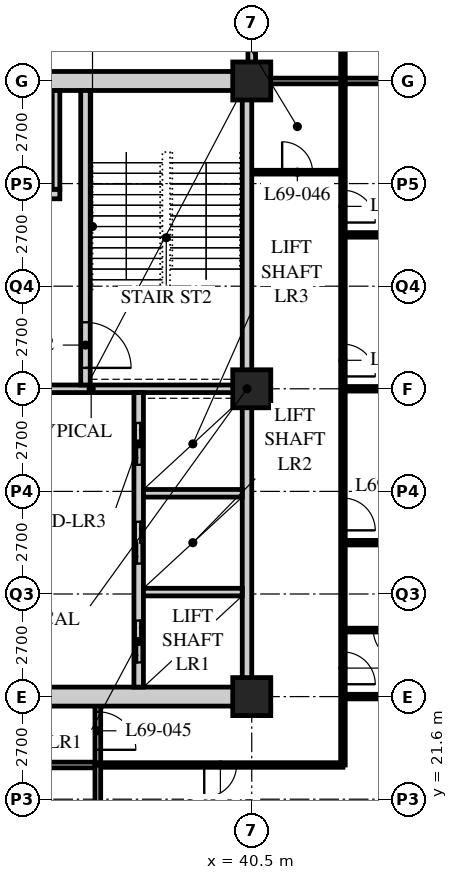
"""IFC4 building model, lengths in metres.
Left out: names, types, materials, properties, quantities, classifications, styles, units other than length and angle.
Written with IfcOpenShell. Run it as: python <this file> out.ifc"""

import sys

from ifc_helpers import new_model, si_unit, direction, frame, frame_2d, origin, origin_2d, place, context, subcontext, project, spatial, rectangle, hollow_rectangle, extrude, element, fill, save


model = new_model("IFC4")
c1 = context("Model", 3, precision=1e-05, world=origin(), true_north=direction((0.0, 1.0)))
c2 = subcontext(c1, "Body", "Model", "MODEL_VIEW")
j1 = project(units=[si_unit("LENGTHUNIT", "METRE"), si_unit("PLANEANGLEUNIT", "RADIAN")], contexts=[c1])
p1 = place(None, origin())
s1 = spatial("IfcSite", under=j1, at=p1, CompositionType="ELEMENT")
p2 = place(p1, origin())
s2 = spatial("IfcBuilding", under=s1, at=p2, CompositionType="ELEMENT")
p3 = place(p2, frame((0.0, 0.0, 269.7)))
s3 = spatial("IfcBuildingStorey", under=s2, at=p3, CompositionType="ELEMENT", Elevation=269.7)
for number, where, z_axis, x_axis in (
    (1, (40.5, 24.3, 0.0), (0.0, 0.0, 1.0), (1.0, 0.0, 0.0)),
    (2, (40.5, 32.4, 0.0), (0.0, 0.0, 1.0), (1.0, 0.0, 0.0)),
    (3, (40.5, 40.5, 0.0), (0.0, 0.0, 1.0), (1.0, 0.0, 0.0)),
):
    element("IfcColumn", number, at=place(p3, frame(where, z_axis=z_axis, x_axis=x_axis)), inside=s3, PredefinedType="COLUMN", context=c2, shape_type="SweptSolid", body=[
        extrude(hollow_rectangle(XDim=1.0, YDim=1.0, WallThickness=0.1, at=origin_2d()), origin(), (0.0, 0.0, 1.0), 3.9),
    ])
p4 = place(p3, frame((12.15, 22.5, 0.0), z_axis=(0.0, 0.0, 1.0), x_axis=(1.0, 0.0, 0.0)))
e4 = element("IfcWall", 4, at=p4, inside=s3, PredefinedType="PARTITIONING", context=c2, shape_type="SweptSolid", body=[
    extrude(rectangle(XDim=24.3, YDim=0.15, at=frame_2d((12.15, 0.0))), origin(), (0.0, 0.0, 1.0), 3.69),
])
p5 = place(p4, frame((4.45, 0.0, 0.0)))
e5 = element("IfcOpeningElement", 5, at=p5, cuts=e4, PredefinedType="OPENING", context=c2, shape_type="SweptSolid", body=[
    extrude(rectangle(XDim=1.0, YDim=2.1, at=frame_2d((0.5, 1.05))), frame((0.0, 0.085, 0.0), z_axis=(0.0, -1.0, 0.0), x_axis=(1.0, 0.0, 0.0)), (0.0, 0.0, 1.0), 0.17),
])
p6 = place(p4, frame((12.55, 0.0, 0.0)))
e6 = element("IfcOpeningElement", 6, at=p6, cuts=e4, PredefinedType="OPENING", context=c2, shape_type="SweptSolid", body=[
    extrude(rectangle(XDim=1.0, YDim=2.1, at=frame_2d((0.5, 1.05))), frame((0.0, 0.085, 0.0), z_axis=(0.0, -1.0, 0.0), x_axis=(1.0, 0.0, 0.0)), (0.0, 0.0, 1.0), 0.17),
])
p7 = place(p4, frame((2.625, 0.0, 0.0)))
e7 = element("IfcOpeningElement", 7, at=p7, cuts=e4, PredefinedType="OPENING", context=c2, shape_type="SweptSolid", body=[
    extrude(rectangle(XDim=1.0, YDim=2.1, at=frame_2d((0.5, 1.05))), frame((0.0, 0.085, 0.0), z_axis=(0.0, -1.0, 0.0), x_axis=(1.0, 0.0, 0.0)), (0.0, 0.0, 1.0), 0.17),
])
p8 = place(p3, frame((36.45, 22.5, 0.0), z_axis=(0.0, 0.0, 1.0), x_axis=(0.0, 1.0, 0.0)))
e8 = element("IfcWall", 8, at=p8, inside=s3, PredefinedType="PARTITIONING", context=c2, shape_type="SweptSolid", body=[
    extrude(rectangle(XDim=1.8, YDim=0.15, at=frame_2d((0.9, 0.0))), origin(), (0.0, 0.0, 1.0), 3.69),
])
p9 = place(p8, frame((0.4, 0.0, 0.0)))
e9 = element("IfcOpeningElement", 9, at=p9, cuts=e8, PredefinedType="OPENING", context=c2, shape_type="SweptSolid", body=[
    extrude(rectangle(XDim=1.0, YDim=2.1, at=frame_2d((0.5, 1.05))), frame((0.0, 0.085, 0.0), z_axis=(0.0, -1.0, 0.0), x_axis=(1.0, 0.0, 0.0)), (0.0, 0.0, 1.0), 0.17),
])
p10 = place(p3, frame((40.5, 40.5, 0.0), z_axis=(0.0, 0.0, 1.0), x_axis=(0.0, 1.0, 0.0)))
e10 = element("IfcWall", 10, at=p10, inside=s3, PredefinedType="SOLIDWALL", context=c2, shape_type="SweptSolid", body=[
    extrude(rectangle(XDim=10.35, YDim=0.2, at=frame_2d((5.175, 0.0))), origin(), (0.0, 0.0, 1.0), 3.078),
])
p11 = place(p3, frame((40.5, 38.1, 0.0), z_axis=(0.0, 0.0, 1.0), x_axis=(1.0, 0.0, 0.0)))
e11 = element("IfcWall", 11, at=p11, inside=s3, PredefinedType="PARTITIONING", context=c2, shape_type="SweptSolid", body=[
    extrude(rectangle(XDim=2.4, YDim=0.1, at=frame_2d((1.2, 0.0))), origin(), (0.0, 0.0, 1.0), 3.69),
])
p12 = place(p11, frame((0.8, 0.0, 0.0)))
e12 = element("IfcOpeningElement", 12, at=p12, cuts=e11, PredefinedType="OPENING", context=c2, shape_type="SweptSolid", body=[
    extrude(rectangle(XDim=0.8, YDim=2.1, at=frame_2d((0.4, 1.05))), frame((0.0, 0.06, 0.0), z_axis=(0.0, -1.0, 0.0), x_axis=(1.0, 0.0, 0.0)), (0.0, 0.0, 1.0), 0.12),
])
p13 = place(p3, frame((42.9, 22.5, 0.0), z_axis=(0.0, 0.0, 1.0), x_axis=(0.0, 1.0, 0.0)))
e13 = element("IfcWall", 13, at=p13, inside=s3, PredefinedType="PARTITIONING", context=c2, shape_type="SweptSolid", body=[
    extrude(rectangle(XDim=18.0, YDim=0.12, at=frame_2d((9.0, 0.0))), origin(), (0.0, 0.0, 1.0), 3.69),
])
p14 = place(p13, frame((2.125, 0.0, 0.0)))
e14 = element("IfcOpeningElement", 14, at=p14, cuts=e13, PredefinedType="OPENING", context=c2, shape_type="SweptSolid", body=[
    extrude(rectangle(XDim=0.85, YDim=2.1, at=frame_2d((0.425, 1.05))), frame((0.0, 0.07, 0.0), z_axis=(0.0, -1.0, 0.0), x_axis=(1.0, 0.0, 0.0)), (0.0, 0.0, 1.0), 0.14),
])
p15 = place(p13, frame((6.175, 0.0, 0.0)))
e15 = element("IfcOpeningElement", 15, at=p15, cuts=e13, PredefinedType="OPENING", context=c2, shape_type="SweptSolid", body=[
    extrude(rectangle(XDim=0.85, YDim=2.1, at=frame_2d((0.425, 1.05))), frame((0.0, 0.07, 0.0), z_axis=(0.0, -1.0, 0.0), x_axis=(1.0, 0.0, 0.0)), (0.0, 0.0, 1.0), 0.14),
])
p16 = place(p13, frame((10.225, 0.0, 0.0)))
e16 = element("IfcOpeningElement", 16, at=p16, cuts=e13, PredefinedType="OPENING", context=c2, shape_type="SweptSolid", body=[
    extrude(rectangle(XDim=0.85, YDim=2.1, at=frame_2d((0.425, 1.05))), frame((0.0, 0.07, 0.0), z_axis=(0.0, -1.0, 0.0), x_axis=(1.0, 0.0, 0.0)), (0.0, 0.0, 1.0), 0.14),
])
p17 = place(p13, frame((14.275, 0.0, 0.0)))
e17 = element("IfcOpeningElement", 17, at=p17, cuts=e13, PredefinedType="OPENING", context=c2, shape_type="SweptSolid", body=[
    extrude(rectangle(XDim=0.85, YDim=2.1, at=frame_2d((0.425, 1.05))), frame((0.0, 0.07, 0.0), z_axis=(0.0, -1.0, 0.0), x_axis=(1.0, 0.0, 0.0)), (0.0, 0.0, 1.0), 0.14),
])
p18 = place(p3, frame((36.45, 22.5, 0.0), z_axis=(0.0, 0.0, 1.0), x_axis=(1.0, 0.0, 0.0)))
e18 = element("IfcWall", 18, at=p18, inside=s3, PredefinedType="PARTITIONING", context=c2, shape_type="SweptSolid", body=[
    extrude(rectangle(XDim=6.45, YDim=0.12, at=frame_2d((3.225, 0.0))), origin(), (0.0, 0.0, 1.0), 3.69),
])
p19 = place(p18, frame((2.8, 0.0, 0.0)))
e19 = element("IfcOpeningElement", 19, at=p19, cuts=e18, PredefinedType="OPENING", context=c2, shape_type="SweptSolid", body=[
    extrude(rectangle(XDim=0.85, YDim=2.1, at=frame_2d((0.425, 1.05))), frame((0.0, 0.07, 0.0), z_axis=(0.0, -1.0, 0.0), x_axis=(1.0, 0.0, 0.0)), (0.0, 0.0, 1.0), 0.14),
])
p20 = place(p3, frame((42.9, 24.3, 0.0), z_axis=(0.0, 0.0, 1.0), x_axis=(1.0, 0.0, 0.0)))
e20 = element("IfcWall", 20, at=p20, inside=s3, PredefinedType="PARTITIONING", context=c2, shape_type="SweptSolid", body=[
    extrude(rectangle(XDim=9.45, YDim=0.12, at=frame_2d((4.725, 0.0))), origin(), (0.0, 0.0, 1.0), 3.078),
])
p21 = place(p3, frame((40.5, 40.5, 0.0), z_axis=(0.0, 0.0, 1.0), x_axis=(1.0, 0.0, 0.0)))
e21 = element("IfcWall", 21, at=p21, inside=s3, PredefinedType="PARTITIONING", context=c2, shape_type="SweptSolid", body=[
    extrude(rectangle(XDim=15.9, YDim=0.15, at=frame_2d((7.95, 0.0))), origin(), (0.0, 0.0, 1.0), 3.078),
])
p22 = place(p3, frame((36.45, 16.5, 0.0), z_axis=(0.0, 0.0, 1.0), x_axis=(0.0, 1.0, 0.0)))
e22 = element("IfcWall", 22, at=p22, inside=s3, PredefinedType="PARTITIONING", context=c2, shape_type="SweptSolid", body=[
    extrude(rectangle(XDim=6.0, YDim=0.15, at=frame_2d((3.0, 0.0))), origin(), (0.0, 0.0, 1.0), 3.69),
])
p23 = place(p3, frame((42.9, 26.05, 0.0), z_axis=(0.0, 0.0, 1.0), x_axis=(1.0, 0.0, 0.0)))
e23 = element("IfcWall", 23, at=p23, inside=s3, PredefinedType="PARTITIONING", context=c2, shape_type="SweptSolid", body=[
    extrude(rectangle(XDim=2.4, YDim=0.1, at=frame_2d((1.2, 0.0))), origin(), (0.0, 0.0, 1.0), 3.69),
])
p24 = place(p23, frame((0.8, 0.0, 0.0)))
e24 = element("IfcOpeningElement", 24, at=p24, cuts=e23, PredefinedType="OPENING", context=c2, shape_type="SweptSolid", body=[
    extrude(rectangle(XDim=0.8, YDim=2.1, at=frame_2d((0.4, 1.05))), frame((0.0, 0.06, 0.0), z_axis=(0.0, -1.0, 0.0), x_axis=(1.0, 0.0, 0.0)), (0.0, 0.0, 1.0), 0.12),
])
p25 = place(p3, frame((42.9, 28.35, 0.0), z_axis=(0.0, 0.0, 1.0), x_axis=(1.0, 0.0, 0.0)))
e25 = element("IfcWall", 25, at=p25, inside=s3, PredefinedType="PARTITIONING", context=c2, shape_type="SweptSolid", body=[
    extrude(rectangle(XDim=13.5, YDim=0.12, at=frame_2d((6.75, 0.0))), origin(), (0.0, 0.0, 1.0), 3.69),
])
p26 = place(p3, frame((42.9, 32.4, 0.0), z_axis=(0.0, 0.0, 1.0), x_axis=(1.0, 0.0, 0.0)))
e26 = element("IfcWall", 26, at=p26, inside=s3, PredefinedType="PARTITIONING", context=c2, shape_type="SweptSolid", body=[
    extrude(rectangle(XDim=13.5, YDim=0.12, at=frame_2d((6.75, 0.0))), origin(), (0.0, 0.0, 1.0), 3.078),
])
p27 = place(p3, frame((42.9, 36.45, 0.0), z_axis=(0.0, 0.0, 1.0), x_axis=(1.0, 0.0, 0.0)))
e27 = element("IfcWall", 27, at=p27, inside=s3, PredefinedType="PARTITIONING", context=c2, shape_type="SweptSolid", body=[
    extrude(rectangle(XDim=13.5, YDim=0.12, at=frame_2d((6.75, 0.0))), origin(), (0.0, 0.0, 1.0), 3.69),
])
p28 = place(p3, frame((42.9, 52.65, 0.0), z_axis=(0.0, 0.0, 1.0), x_axis=(0.0, -1.0, 0.0)))
e28 = element("IfcWall", 28, at=p28, inside=s3, PredefinedType="PARTITIONING", context=c2, shape_type="SweptSolid", body=[
    extrude(rectangle(XDim=12.15, YDim=0.12, at=frame_2d((6.075, 0.0))), origin(), (0.0, 0.0, 1.0), 3.69),
])
p29 = place(p28, frame((2.125, 0.0, 0.0)))
e29 = element("IfcOpeningElement", 29, at=p29, cuts=e28, PredefinedType="OPENING", context=c2, shape_type="SweptSolid", body=[
    extrude(rectangle(XDim=0.85, YDim=2.1, at=frame_2d((0.425, 1.05))), frame((0.0, 0.07, 0.0), z_axis=(0.0, -1.0, 0.0), x_axis=(1.0, 0.0, 0.0)), (0.0, 0.0, 1.0), 0.14),
])
p30 = place(p28, frame((8.425, 0.0, 0.0)))
e30 = element("IfcOpeningElement", 30, at=p30, cuts=e28, PredefinedType="OPENING", context=c2, shape_type="SweptSolid", body=[
    extrude(rectangle(XDim=0.85, YDim=2.1, at=frame_2d((0.425, 1.05))), frame((0.0, 0.07, 0.0), z_axis=(0.0, -1.0, 0.0), x_axis=(1.0, 0.0, 0.0)), (0.0, 0.0, 1.0), 0.14),
])
p31 = place(p3, frame((15.95, 24.3, 0.0), z_axis=(0.0, 0.0, 1.0), x_axis=(1.0, 0.0, 0.0)))
e31 = element("IfcWall", 31, at=p31, inside=s3, PredefinedType="SOLIDWALL", context=c2, shape_type="SweptSolid", body=[
    extrude(rectangle(XDim=24.55, YDim=0.5, at=frame_2d((12.275, 0.0))), origin(), (0.0, 0.0, 1.0), 3.04),
])
p32 = place(p31, frame((11.5, 0.0, 0.0)))
e32 = element("IfcOpeningElement", 32, at=p32, cuts=e31, PredefinedType="OPENING", context=c2, shape_type="SweptSolid", body=[
    extrude(rectangle(XDim=1.8, YDim=2.4, at=frame_2d((0.9, 1.2))), frame((0.0, 0.26, 0.0), z_axis=(0.0, -1.0, 0.0), x_axis=(1.0, 0.0, 0.0)), (0.0, 0.0, 1.0), 0.52),
])
p33 = place(p3, frame((15.95, 40.5, 0.0), z_axis=(0.0, 0.0, 1.0), x_axis=(1.0, 0.0, 0.0)))
e33 = element("IfcWall", 33, at=p33, inside=s3, PredefinedType="SOLIDWALL", context=c2, shape_type="SweptSolid", body=[
    extrude(rectangle(XDim=24.55, YDim=0.5, at=frame_2d((12.275, 0.0))), origin(), (0.0, 0.0, 1.0), 3.04),
])
p34 = place(p33, frame((11.5, 0.0, 0.0)))
e34 = element("IfcOpeningElement", 34, at=p34, cuts=e33, PredefinedType="OPENING", context=c2, shape_type="SweptSolid", body=[
    extrude(rectangle(XDim=1.8, YDim=2.4, at=frame_2d((0.9, 1.2))), frame((0.0, 0.26, 0.0), z_axis=(0.0, -1.0, 0.0), x_axis=(1.0, 0.0, 0.0)), (0.0, 0.0, 1.0), 0.52),
])
p35 = place(p3, frame((40.375, 24.55, 0.0), z_axis=(0.0, 0.0, 1.0), x_axis=(0.0, 1.0, 0.0)))
e35 = element("IfcWall", 35, at=p35, inside=s3, PredefinedType="SOLIDWALL", context=c2, shape_type="SweptSolid", body=[
    extrude(rectangle(XDim=15.7, YDim=0.25, at=frame_2d((7.85, 0.0))), origin(), (0.0, 0.0, 1.0), 3.078),
])
p36 = place(p3, frame((32.3, 32.4, 0.0), z_axis=(0.0, 0.0, 1.0), x_axis=(1.0, 0.0, 0.0)))
e36 = element("IfcWall", 36, at=p36, inside=s3, PredefinedType="SOLIDWALL", context=c2, shape_type="SweptSolid", body=[
    extrude(rectangle(XDim=7.95, YDim=0.2, at=frame_2d((3.975, 0.0))), origin(), (0.0, 0.0, 1.0), 3.078),
])
p37 = place(p3, frame((37.525, 24.55, 0.0), z_axis=(0.0, 0.0, 1.0), x_axis=(0.0, 1.0, 0.0)))
e37 = element("IfcWall", 37, at=p37, inside=s3, PredefinedType="SOLIDWALL", context=c2, shape_type="SweptSolid", body=[
    extrude(rectangle(XDim=7.75, YDim=0.25, at=frame_2d((3.875, 0.0))), origin(), (0.0, 0.0, 1.0), 3.69),
])
p38 = place(p37, frame((0.65, 0.0, 0.0)))
e38 = element("IfcOpeningElement", 38, at=p38, cuts=e37, PredefinedType="OPENING", context=c2, shape_type="SweptSolid", body=[
    extrude(rectangle(XDim=1.1, YDim=2.4, at=frame_2d((0.55, 1.2))), frame((0.0, 0.135, 0.0), z_axis=(0.0, -1.0, 0.0), x_axis=(1.0, 0.0, 0.0)), (0.0, 0.0, 1.0), 0.27),
])
p39 = place(p37, frame((3.25, 0.0, 0.0)))
e39 = element("IfcOpeningElement", 39, at=p39, cuts=e37, PredefinedType="OPENING", context=c2, shape_type="SweptSolid", body=[
    extrude(rectangle(XDim=1.1, YDim=2.4, at=frame_2d((0.55, 1.2))), frame((0.0, 0.135, 0.0), z_axis=(0.0, -1.0, 0.0), x_axis=(1.0, 0.0, 0.0)), (0.0, 0.0, 1.0), 0.27),
])
p40 = place(p37, frame((5.85, 0.0, 0.0)))
e40 = element("IfcOpeningElement", 40, at=p40, cuts=e37, PredefinedType="OPENING", context=c2, shape_type="SweptSolid", body=[
    extrude(rectangle(XDim=1.1, YDim=2.4, at=frame_2d((0.55, 1.2))), frame((0.0, 0.135, 0.0), z_axis=(0.0, -1.0, 0.0), x_axis=(1.0, 0.0, 0.0)), (0.0, 0.0, 1.0), 0.27),
])
for number, where, z_axis, x_axis in (
    (41, (37.65, 27.05, 0.0), (0.0, 0.0, 1.0), (1.0, 0.0, 0.0)),
    (42, (37.65, 29.65, 0.0), (0.0, 0.0, 1.0), (1.0, 0.0, 0.0)),
):
    element("IfcWall", number, at=place(p3, frame(where, z_axis=z_axis, x_axis=x_axis)), inside=s3, PredefinedType="SOLIDWALL", context=c2, shape_type="SweptSolid", body=[
        extrude(rectangle(XDim=2.6, YDim=0.2, at=frame_2d((1.3, 0.0))), origin(), (0.0, 0.0, 1.0), 3.69),
    ])
p41 = place(p3, frame((36.125, 32.5, 0.0), z_axis=(0.0, 0.0, 1.0), x_axis=(0.0, 1.0, 0.0)))
e43 = element("IfcWall", 43, at=p41, inside=s3, PredefinedType="SOLIDWALL", context=c2, shape_type="SweptSolid", body=[
    extrude(rectangle(XDim=7.75, YDim=0.25, at=frame_2d((3.875, 0.0))), origin(), (0.0, 0.0, 1.0), 3.69),
])
p42 = place(p41, frame((0.45, 0.0, 0.0)))
e44 = element("IfcOpeningElement", 44, at=p42, cuts=e43, PredefinedType="OPENING", context=c2, shape_type="SweptSolid", body=[
    extrude(rectangle(XDim=1.2, YDim=2.1, at=frame_2d((0.6, 1.05))), frame((0.0, 0.135, 0.0), z_axis=(0.0, -1.0, 0.0), x_axis=(1.0, 0.0, 0.0)), (0.0, 0.0, 1.0), 0.27),
])
p43 = place(p3, frame((32.5, 37.525, 0.0), z_axis=(0.0, 0.0, 1.0), x_axis=(1.0, 0.0, 0.0)))
e45 = element("IfcWall", 45, at=p43, inside=s3, PredefinedType="SOLIDWALL", context=c2, shape_type="SweptSolid", body=[
    extrude(rectangle(XDim=2.95, YDim=0.25, at=frame_2d((1.475, 0.0))), origin(), (0.0, 0.0, 1.0), 3.69),
])
p44 = place(p43, frame((0.9, 0.0, 0.0)))
e46 = element("IfcOpeningElement", 46, at=p44, cuts=e45, PredefinedType="OPENING", context=c2, shape_type="SweptSolid", body=[
    extrude(rectangle(XDim=1.1, YDim=2.4, at=frame_2d((0.55, 1.2))), frame((0.0, 0.135, 0.0), z_axis=(0.0, -1.0, 0.0), x_axis=(1.0, 0.0, 0.0)), (0.0, 0.0, 1.0), 0.27),
])
p45 = place(p3, frame((35.35, 37.65, 0.0), z_axis=(0.0, 0.0, 1.0), x_axis=(0.0, 1.0, 0.0)))
e47 = element("IfcWall", 47, at=p45, inside=s3, PredefinedType="SOLIDWALL", context=c2, shape_type="SweptSolid", body=[
    extrude(rectangle(XDim=2.6, YDim=0.2, at=frame_2d((1.3, 0.0))), origin(), (0.0, 0.0, 1.0), 3.69),
])
p46 = place(p9, origin())
e48 = element("IfcDoor", 48, at=p46, inside=s3, OperationType="SINGLE_SWING_RIGHT", PredefinedType="DOOR", context=c2, shape_type="SweptSolid", body=[
    extrude(rectangle(XDim=1.0, YDim=2.1, at=frame_2d((0.5, 1.05))), frame((0.0, 0.025, 0.0), z_axis=(0.0, -1.0, 0.0), x_axis=(1.0, 0.0, 0.0)), (0.0, 0.0, 1.0), 0.05),
])
fill(e9, e48)
p47 = place(p12, origin())
e49 = element("IfcDoor", 49, at=p47, inside=s3, OperationType="SINGLE_SWING_LEFT", PredefinedType="DOOR", context=c2, shape_type="SweptSolid", body=[
    extrude(rectangle(XDim=0.8, YDim=2.1, at=frame_2d((0.4, 1.05))), frame((0.0, 0.025, 0.0), z_axis=(0.0, -1.0, 0.0), x_axis=(1.0, 0.0, 0.0)), (0.0, 0.0, 1.0), 0.05),
])
fill(e12, e49)
p48 = place(p19, origin())
e50 = element("IfcDoor", 50, at=p48, inside=s3, OperationType="SINGLE_SWING_RIGHT", PredefinedType="DOOR", context=c2, shape_type="SweptSolid", body=[
    extrude(rectangle(XDim=0.85, YDim=2.1, at=frame_2d((0.425, 1.05))), frame((0.0, 0.025, 0.0), z_axis=(0.0, -1.0, 0.0), x_axis=(1.0, 0.0, 0.0)), (0.0, 0.0, 1.0), 0.05),
])
fill(e19, e50)
p49 = place(p24, origin())
e51 = element("IfcDoor", 51, at=p49, inside=s3, OperationType="SINGLE_SWING_LEFT", PredefinedType="DOOR", context=c2, shape_type="SweptSolid", body=[
    extrude(rectangle(XDim=0.8, YDim=2.1, at=frame_2d((0.4, 1.05))), frame((0.0, 0.025, 0.0), z_axis=(0.0, -1.0, 0.0), x_axis=(1.0, 0.0, 0.0)), (0.0, 0.0, 1.0), 0.05),
])
fill(e24, e51)
p50 = place(p14, origin())
e52 = element("IfcDoor", 52, at=p50, inside=s3, OperationType="SINGLE_SWING_RIGHT", PredefinedType="DOOR", context=c2, shape_type="SweptSolid", body=[
    extrude(rectangle(XDim=0.85, YDim=2.1, at=frame_2d((0.425, 1.05))), frame((0.0, 0.025, 0.0), z_axis=(0.0, -1.0, 0.0), x_axis=(1.0, 0.0, 0.0)), (0.0, 0.0, 1.0), 0.05),
])
fill(e14, e52)
p51 = place(p15, origin())
e53 = element("IfcDoor", 53, at=p51, inside=s3, OperationType="SINGLE_SWING_RIGHT", PredefinedType="DOOR", context=c2, shape_type="SweptSolid", body=[
    extrude(rectangle(XDim=0.85, YDim=2.1, at=frame_2d((0.425, 1.05))), frame((0.0, 0.025, 0.0), z_axis=(0.0, -1.0, 0.0), x_axis=(1.0, 0.0, 0.0)), (0.0, 0.0, 1.0), 0.05),
])
fill(e15, e53)
p52 = place(p16, origin())
e54 = element("IfcDoor", 54, at=p52, inside=s3, OperationType="SINGLE_SWING_RIGHT", PredefinedType="DOOR", context=c2, shape_type="SweptSolid", body=[
    extrude(rectangle(XDim=0.85, YDim=2.1, at=frame_2d((0.425, 1.05))), frame((0.0, 0.025, 0.0), z_axis=(0.0, -1.0, 0.0), x_axis=(1.0, 0.0, 0.0)), (0.0, 0.0, 1.0), 0.05),
])
fill(e16, e54)
p53 = place(p17, origin())
e55 = element("IfcDoor", 55, at=p53, inside=s3, OperationType="SINGLE_SWING_RIGHT", PredefinedType="DOOR", context=c2, shape_type="SweptSolid", body=[
    extrude(rectangle(XDim=0.85, YDim=2.1, at=frame_2d((0.425, 1.05))), frame((0.0, 0.025, 0.0), z_axis=(0.0, -1.0, 0.0), x_axis=(1.0, 0.0, 0.0)), (0.0, 0.0, 1.0), 0.05),
])
fill(e17, e55)
p54 = place(p42, origin())
e56 = element("IfcDoor", 56, at=p54, inside=s3, OperationType="SINGLE_SWING_RIGHT", PredefinedType="DOOR", context=c2, shape_type="SweptSolid", body=[
    extrude(rectangle(XDim=1.2, YDim=2.1, at=frame_2d((0.6, 1.05))), frame((0.0, 0.025, 0.0), z_axis=(0.0, -1.0, 0.0), x_axis=(1.0, 0.0, 0.0)), (0.0, 0.0, 1.0), 0.05),
])
fill(e44, e56)
p55 = place(p38, origin())
e57 = element("IfcDoor", 57, at=p55, inside=s3, OperationType="DOUBLE_DOOR_SLIDING", PredefinedType="DOOR", context=c2, shape_type="SweptSolid", body=[
    extrude(rectangle(XDim=1.1, YDim=2.4, at=frame_2d((0.55, 1.2))), frame((0.0, 0.025, 0.0), z_axis=(0.0, -1.0, 0.0), x_axis=(1.0, 0.0, 0.0)), (0.0, 0.0, 1.0), 0.05),
])
fill(e38, e57)
p56 = place(p39, origin())
e58 = element("IfcDoor", 58, at=p56, inside=s3, OperationType="DOUBLE_DOOR_SLIDING", PredefinedType="DOOR", context=c2, shape_type="SweptSolid", body=[
    extrude(rectangle(XDim=1.1, YDim=2.4, at=frame_2d((0.55, 1.2))), frame((0.0, 0.025, 0.0), z_axis=(0.0, -1.0, 0.0), x_axis=(1.0, 0.0, 0.0)), (0.0, 0.0, 1.0), 0.05),
])
fill(e39, e58)
p57 = place(p40, origin())
e59 = element("IfcDoor", 59, at=p57, inside=s3, OperationType="DOUBLE_DOOR_SLIDING", PredefinedType="DOOR", context=c2, shape_type="SweptSolid", body=[
    extrude(rectangle(XDim=1.1, YDim=2.4, at=frame_2d((0.55, 1.2))), frame((0.0, 0.025, 0.0), z_axis=(0.0, -1.0, 0.0), x_axis=(1.0, 0.0, 0.0)), (0.0, 0.0, 1.0), 0.05),
])
fill(e40, e59)
save(model, sys.argv[1])
